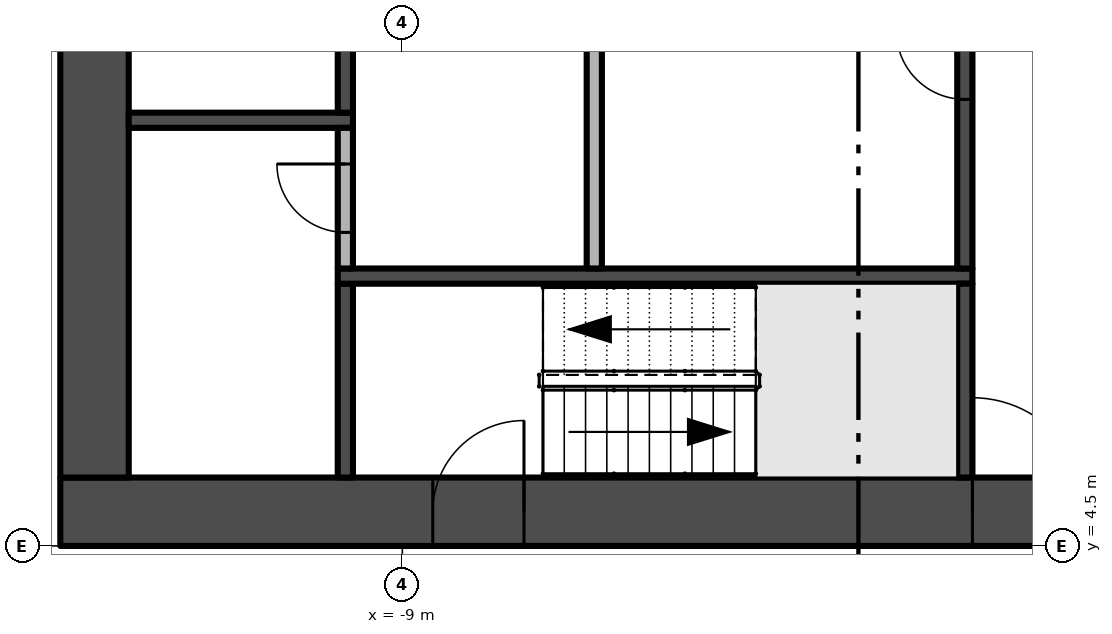
"""IFC4 building model, lengths in metres.
Left out: names, types, materials, properties, quantities, classifications, styles, units other than length and angle.
Written with IfcOpenShell. Run it as: python <this file> out.ifc"""

import sys

from ifc_helpers import new_model, si_unit, direction, frame, frame_2d, origin, place, context, subcontext, project, spatial, rectangle, extrude, element, fill, save


model = new_model("IFC4")
c1 = context("Model", 3, precision=1e-05, world=origin(), true_north=direction((0.0, 1.0)))
c2 = subcontext(c1, "Body", "Model", "MODEL_VIEW")
j1 = project(units=[si_unit("LENGTHUNIT", "METRE"), si_unit("PLANEANGLEUNIT", "RADIAN")], contexts=[c1])
p1 = place(None, origin())
s1 = spatial("IfcSite", under=j1, at=p1, CompositionType="ELEMENT")
p2 = place(p1, origin())
s2 = spatial("IfcBuilding", under=s1, at=p2, CompositionType="ELEMENT")
p3 = place(p2, frame((0.0, 0.0, 56.8)))
s3 = spatial("IfcBuildingStorey", under=s2, at=p3, CompositionType="ELEMENT", Elevation=56.8)
p4 = place(p3, frame((-13.5, 4.95, -0.3), z_axis=(0.0, 0.0, 1.0), x_axis=(1.0, 0.0, 0.0)))
e1 = element("IfcWall", 1, at=p4, inside=s3, PredefinedType="SHEAR", context=c2, shape_type="SweptSolid", body=[
    extrude(rectangle(XDim=27.0, YDim=0.9, at=frame_2d((13.5, 0.0))), origin(), (0.0, 0.0, 1.0), 3.8),
])
p5 = place(p4, frame((12.0, 0.0, 0.3)))
e2 = element("IfcOpeningElement", 2, at=p5, cuts=e1, PredefinedType="OPENING", context=c2, shape_type="SweptSolid", body=[
    extrude(rectangle(XDim=3.0, YDim=2.4, at=frame_2d((1.5, 1.2))), frame((0.0, 0.46, 0.0), z_axis=(0.0, -1.0, 0.0), x_axis=(1.0, 0.0, 0.0)), (0.0, 0.0, 1.0), 0.92),
])
p6 = place(p4, frame((4.9, 0.0, 0.3)))
e3 = element("IfcOpeningElement", 3, at=p6, cuts=e1, PredefinedType="OPENING", context=c2, shape_type="SweptSolid", body=[
    extrude(rectangle(XDim=1.2, YDim=2.2, at=frame_2d((0.6, 1.1))), frame((0.0, 0.46, 0.0), z_axis=(0.0, -1.0, 0.0), x_axis=(1.0, 0.0, 0.0)), (0.0, 0.0, 1.0), 0.92),
])
p7 = place(p4, frame((20.75, 0.0, 0.3)))
e4 = element("IfcOpeningElement", 4, at=p7, cuts=e1, PredefinedType="OPENING", context=c2, shape_type="SweptSolid", body=[
    extrude(rectangle(XDim=1.5, YDim=2.2, at=frame_2d((0.75, 1.1))), frame((0.0, 0.46, 0.0), z_axis=(0.0, -1.0, 0.0), x_axis=(1.0, 0.0, 0.0)), (0.0, 0.0, 1.0), 0.92),
])
p8 = place(p4, frame((17.4, 0.0, 0.3)))
e5 = element("IfcOpeningElement", 5, at=p8, cuts=e1, PredefinedType="OPENING", context=c2, shape_type="SweptSolid", body=[
    extrude(rectangle(XDim=1.2, YDim=2.2, at=frame_2d((0.6, 1.1))), frame((0.0, 0.46, 0.0), z_axis=(0.0, -1.0, 0.0), x_axis=(1.0, 0.0, 0.0)), (0.0, 0.0, 1.0), 0.92),
])
p9 = place(p3, frame((-13.05, 21.6, -0.3), z_axis=(0.0, 0.0, 1.0), x_axis=(0.0, -1.0, 0.0)))
e6 = element("IfcWall", 6, at=p9, inside=s3, PredefinedType="SHEAR", context=c2, shape_type="SweptSolid", body=[
    extrude(rectangle(XDim=16.2, YDim=0.9, at=frame_2d((8.1, 0.0))), origin(), (0.0, 0.0, 1.0), 3.8),
])
p10 = place(p9, frame((9.0, 0.0, 0.3)))
e7 = element("IfcOpeningElement", 7, at=p10, cuts=e6, PredefinedType="OPENING", context=c2, shape_type="SweptSolid", body=[
    extrude(rectangle(XDim=1.2, YDim=2.2, at=frame_2d((0.6, 1.1))), frame((0.0, 0.46, 0.0), z_axis=(0.0, -1.0, 0.0), x_axis=(1.0, 0.0, 0.0)), (0.0, 0.0, 1.0), 0.92),
])
p11 = place(p3, frame((-12.6, 10.1, 0.0), z_axis=(0.0, 0.0, 1.0), x_axis=(1.0, 0.0, 0.0)))
e8 = element("IfcWall", 8, at=p11, inside=s3, PredefinedType="SHEAR", context=c2, shape_type="SweptSolid", body=[
    extrude(rectangle(XDim=2.95, YDim=0.2, at=frame_2d((1.475, 0.0))), origin(), (0.0, 0.0, 1.0), 3.5),
])
p12 = place(p3, frame((-9.75, 5.4, 0.0), z_axis=(0.0, 0.0, 1.0), x_axis=(0.0, 1.0, 0.0)))
e9 = element("IfcWall", 9, at=p12, inside=s3, PredefinedType="SHEAR", context=c2, shape_type="SweptSolid", body=[
    extrude(rectangle(XDim=2.55, YDim=0.2, at=frame_2d((1.275, 0.0))), origin(), (0.0, 0.0, 1.0), 3.5),
])
p13 = place(p3, frame((-9.85, 8.05, 0.0), z_axis=(0.0, 0.0, 1.0), x_axis=(1.0, 0.0, 0.0)))
e10 = element("IfcWall", 10, at=p13, inside=s3, PredefinedType="SHEAR", context=c2, shape_type="SweptSolid", body=[
    extrude(rectangle(XDim=8.35, YDim=0.2, at=frame_2d((4.175, 0.0))), origin(), (0.0, 0.0, 1.0), 3.5),
])
p14 = place(p3, frame((-9.75, 8.15, 0.0), z_axis=(0.0, 0.0, 1.0), x_axis=(0.0, 1.0, 0.0)))
e11 = element("IfcWall", 11, at=p14, inside=s3, PredefinedType="PARTITIONING", context=c2, shape_type="SweptSolid", body=[
    extrude(rectangle(XDim=1.85, YDim=0.2, at=frame_2d((0.925, 0.0))), origin(), (0.0, 0.0, 1.0), 3.5),
])
p15 = place(p14, frame((0.475, 0.0, 0.0)))
e12 = element("IfcOpeningElement", 12, at=p15, cuts=e11, PredefinedType="OPENING", context=c2, shape_type="SweptSolid", body=[
    extrude(rectangle(XDim=0.9, YDim=2.1, at=frame_2d((0.45, 1.05))), frame((0.0, 0.11, 0.0), z_axis=(0.0, -1.0, 0.0), x_axis=(1.0, 0.0, 0.0)), (0.0, 0.0, 1.0), 0.22),
])
p16 = place(p3, frame((-9.75, 10.2, 0.0), z_axis=(0.0, 0.0, 1.0), x_axis=(0.0, 1.0, 0.0)))
e13 = element("IfcWall", 13, at=p16, inside=s3, PredefinedType="SHEAR", context=c2, shape_type="SweptSolid", body=[
    extrude(rectangle(XDim=5.7, YDim=0.2, at=frame_2d((2.85, 0.0))), origin(), (0.0, 0.0, 1.0), 3.5),
])
p17 = place(p3, frame((-6.475, 8.15, 0.0), z_axis=(0.0, 0.0, 1.0), x_axis=(0.0, 1.0, 0.0)))
e14 = element("IfcWall", 14, at=p17, inside=s3, PredefinedType="PARTITIONING", context=c2, shape_type="SweptSolid", body=[
    extrude(rectangle(XDim=5.35, YDim=0.2, at=frame_2d((2.675, 0.0))), origin(), (0.0, 0.0, 1.0), 3.5),
])
p18 = place(p3, frame((-1.6, 5.4, 0.0), z_axis=(0.0, 0.0, 1.0), x_axis=(0.0, 1.0, 0.0)))
e15 = element("IfcWall", 15, at=p18, inside=s3, PredefinedType="SHEAR", context=c2, shape_type="SweptSolid", body=[
    extrude(rectangle(XDim=2.55, YDim=0.2, at=frame_2d((1.275, 0.0))), origin(), (0.0, 0.0, 1.0), 3.5),
])
p19 = place(p3, frame((-1.6, 8.15, 0.0), z_axis=(0.0, 0.0, 1.0), x_axis=(0.0, 1.0, 0.0)))
e16 = element("IfcWall", 16, at=p19, inside=s3, PredefinedType="SHEAR", context=c2, shape_type="SweptSolid", body=[
    extrude(rectangle(XDim=5.35, YDim=0.2, at=frame_2d((2.675, 0.0))), origin(), (0.0, 0.0, 1.0), 3.5),
])
p20 = place(p19, frame((2.225, 0.0, 0.0)))
e17 = element("IfcOpeningElement", 17, at=p20, cuts=e16, PredefinedType="OPENING", context=c2, shape_type="SweptSolid", body=[
    extrude(rectangle(XDim=0.9, YDim=2.1, at=frame_2d((0.45, 1.05))), frame((0.0, 0.11, 0.0), z_axis=(0.0, -1.0, 0.0), x_axis=(1.0, 0.0, 0.0)), (0.0, 0.0, 1.0), 0.22),
])
p21 = place(p5, frame((3.0, 0.0, 0.0), z_axis=(0.0, 0.0, 1.0), x_axis=(-1.0, 0.0, 0.0)))
e18 = element("IfcDoor", 18, at=p21, inside=s3, OperationType="DOUBLE_DOOR_SINGLE_SWING", PredefinedType="DOOR", context=c2, shape_type="SweptSolid", body=[
    extrude(rectangle(XDim=3.0, YDim=2.4, at=frame_2d((1.5, 1.2))), frame((0.0, 0.025, 0.0), z_axis=(0.0, -1.0, 0.0), x_axis=(1.0, 0.0, 0.0)), (0.0, 0.0, 1.0), 0.05),
])
fill(e2, e18)
p22 = place(p6, frame((1.2, 0.0, 0.0), z_axis=(0.0, 0.0, 1.0), x_axis=(-1.0, 0.0, 0.0)))
e19 = element("IfcDoor", 19, at=p22, inside=s3, OperationType="SINGLE_SWING_LEFT", PredefinedType="DOOR", context=c2, shape_type="SweptSolid", body=[
    extrude(rectangle(XDim=1.2, YDim=2.2, at=frame_2d((0.6, 1.1))), frame((0.0, 0.025, 0.0), z_axis=(0.0, -1.0, 0.0), x_axis=(1.0, 0.0, 0.0)), (0.0, 0.0, 1.0), 0.05),
])
fill(e3, e19)
p23 = place(p20, origin())
e20 = element("IfcDoor", 20, at=p23, inside=s3, OperationType="SINGLE_SWING_RIGHT", PredefinedType="DOOR", context=c2, shape_type="SweptSolid", body=[
    extrude(rectangle(XDim=0.9, YDim=2.1, at=frame_2d((0.45, 1.05))), frame((0.0, 0.025, 0.0), z_axis=(0.0, -1.0, 0.0), x_axis=(1.0, 0.0, 0.0)), (0.0, 0.0, 1.0), 0.05),
])
fill(e17, e20)
p24 = place(p15, origin())
e21 = element("IfcDoor", 21, at=p24, inside=s3, OperationType="SINGLE_SWING_RIGHT", PredefinedType="DOOR", context=c2, shape_type="SweptSolid", body=[
    extrude(rectangle(XDim=0.9, YDim=2.1, at=frame_2d((0.45, 1.05))), frame((0.0, 0.025, 0.0), z_axis=(0.0, -1.0, 0.0), x_axis=(1.0, 0.0, 0.0)), (0.0, 0.0, 1.0), 0.05),
])
fill(e12, e21)
save(model, sys.argv[1])
